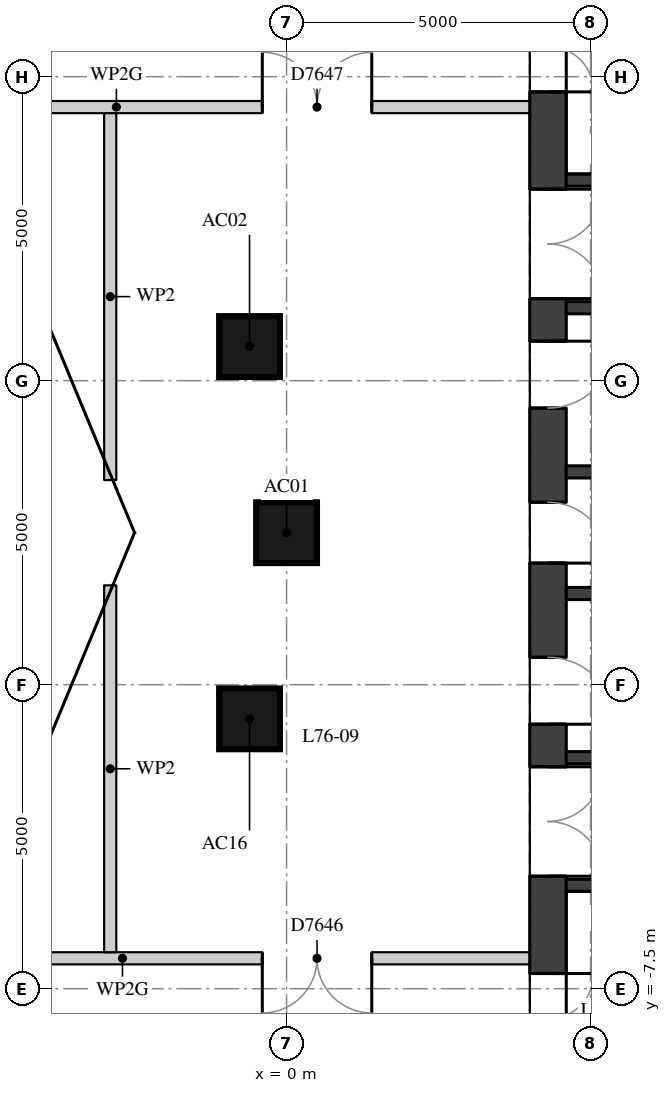
"""IFC4 building model, lengths in metres.
Left out: names, types, materials, properties, quantities, classifications, styles, units other than length and angle.
Written with IfcOpenShell. Run it as: python <this file> out.ifc"""

import sys

from ifc_helpers import new_model, si_unit, direction, frame, frame_2d, origin, origin_2d, place, context, subcontext, project, spatial, rectangle, extrude, element, fill, save


model = new_model("IFC4")
c1 = context("Model", 3, precision=1e-05, world=origin(), true_north=direction((0.0, 1.0)))
c2 = subcontext(c1, "Body", "Model", "MODEL_VIEW")
j1 = project(units=[si_unit("LENGTHUNIT", "METRE"), si_unit("PLANEANGLEUNIT", "RADIAN")], contexts=[c1])
p1 = place(None, origin())
s1 = spatial("IfcSite", under=j1, at=p1, CompositionType="ELEMENT")
p2 = place(p1, origin())
s2 = spatial("IfcBuilding", under=s1, at=p2, CompositionType="ELEMENT")
p3 = place(p2, frame((0.0, 0.0, 269.2)))
s3 = spatial("IfcBuildingStorey", under=s2, at=p3, CompositionType="ELEMENT", Elevation=269.2)
for number, where, z_axis, x_axis in (
    (1, (0.0, 0.0, 0.0), (0.0, 0.0, 1.0), (1.0, 0.0, 0.0)),
    (2, (-0.609, 3.062, 0.0), (0.0, 0.0, 1.0), (1.0, 0.0, 0.0)),
    (3, (-0.609, -3.062, 0.0), (0.0, 0.0, 1.0), (1.0, 0.0, 0.0)),
):
    element("IfcColumn", number, at=place(p3, frame(where, z_axis=z_axis, x_axis=x_axis)), inside=s3, PredefinedType="COLUMN", context=c2, shape_type="SweptSolid", body=[
        extrude(rectangle(XDim=1.0, YDim=1.0, at=origin_2d()), origin(), (0.0, 0.0, 1.0), 6.0),
    ])
p4 = place(p3, frame((4.3, -9.4, 0.0), z_axis=(0.0, 0.0, 1.0), x_axis=(0.0, 1.0, 0.0)))
e4 = element("IfcWall", 4, at=p4, inside=s3, PredefinedType="SHEAR", context=c2, shape_type="SweptSolid", body=[
    extrude(rectangle(XDim=18.8, YDim=0.6, at=frame_2d((9.4, 0.0))), origin(), (0.0, 0.0, 1.0), 5.7),
])
p5 = place(p4, frame((0.65, 0.0, 0.0)))
e5 = element("IfcOpeningElement", 5, at=p5, cuts=e4, PredefinedType="OPENING", context=c2, shape_type="SweptSolid", body=[
    extrude(rectangle(XDim=1.5, YDim=2.1, at=frame_2d((0.75, 1.05))), frame((0.0, 0.31, 0.0), z_axis=(0.0, -1.0, 0.0), x_axis=(1.0, 0.0, 0.0)), (0.0, 0.0, 1.0), 0.62),
])
p6 = place(p4, frame((3.75, 0.0, 0.0)))
e6 = element("IfcOpeningElement", 6, at=p6, cuts=e4, PredefinedType="OPENING", context=c2, shape_type="SweptSolid", body=[
    extrude(rectangle(XDim=1.8, YDim=2.1, at=frame_2d((0.9, 1.05))), frame((0.0, 0.31, 0.0), z_axis=(0.0, -1.0, 0.0), x_axis=(1.0, 0.0, 0.0)), (0.0, 0.0, 1.0), 0.62),
])
p7 = place(p4, frame((6.25, 0.0, 0.0)))
e7 = element("IfcOpeningElement", 7, at=p7, cuts=e4, PredefinedType="OPENING", context=c2, shape_type="SweptSolid", body=[
    extrude(rectangle(XDim=1.1, YDim=2.1, at=frame_2d((0.55, 1.05))), frame((0.0, 0.31, 0.0), z_axis=(0.0, -1.0, 0.0), x_axis=(1.0, 0.0, 0.0)), (0.0, 0.0, 1.0), 0.62),
])
p8 = place(p4, frame((8.9, 0.0, 0.0)))
e8 = element("IfcOpeningElement", 8, at=p8, cuts=e4, PredefinedType="OPENING", context=c2, shape_type="SweptSolid", body=[
    extrude(rectangle(XDim=1.0, YDim=2.1, at=frame_2d((0.5, 1.05))), frame((0.0, 0.31, 0.0), z_axis=(0.0, -1.0, 0.0), x_axis=(1.0, 0.0, 0.0)), (0.0, 0.0, 1.0), 0.62),
])
p9 = place(p4, frame((11.45, 0.0, 0.0)))
e9 = element("IfcOpeningElement", 9, at=p9, cuts=e4, PredefinedType="OPENING", context=c2, shape_type="SweptSolid", body=[
    extrude(rectangle(XDim=1.1, YDim=2.1, at=frame_2d((0.55, 1.05))), frame((0.0, 0.31, 0.0), z_axis=(0.0, -1.0, 0.0), x_axis=(1.0, 0.0, 0.0)), (0.0, 0.0, 1.0), 0.62),
])
p10 = place(p4, frame((13.25, 0.0, 0.0)))
e10 = element("IfcOpeningElement", 10, at=p10, cuts=e4, PredefinedType="OPENING", context=c2, shape_type="SweptSolid", body=[
    extrude(rectangle(XDim=1.8, YDim=2.1, at=frame_2d((0.9, 1.05))), frame((0.0, 0.31, 0.0), z_axis=(0.0, -1.0, 0.0), x_axis=(1.0, 0.0, 0.0)), (0.0, 0.0, 1.0), 0.62),
])
p11 = place(p4, frame((16.65, 0.0, 0.0)))
e11 = element("IfcOpeningElement", 11, at=p11, cuts=e4, PredefinedType="OPENING", context=c2, shape_type="SweptSolid", body=[
    extrude(rectangle(XDim=1.5, YDim=2.1, at=frame_2d((0.75, 1.05))), frame((0.0, 0.31, 0.0), z_axis=(0.0, -1.0, 0.0), x_axis=(1.0, 0.0, 0.0)), (0.0, 0.0, 1.0), 0.62),
])
p12 = place(p3, frame((4.6, 5.8, 0.0), z_axis=(0.0, 0.0, 1.0), x_axis=(1.0, 0.0, 0.0)))
e12 = element("IfcWall", 12, at=p12, inside=s3, PredefinedType="SHEAR", context=c2, shape_type="SweptSolid", body=[
    extrude(rectangle(XDim=10.8, YDim=0.2, at=frame_2d((5.4, 0.0))), origin(), (0.0, 0.0, 1.0), 5.7),
])
p13 = place(p12, frame((8.15, 0.0, 0.0)))
e13 = element("IfcOpeningElement", 13, at=p13, cuts=e12, PredefinedType="OPENING", context=c2, shape_type="SweptSolid", body=[
    extrude(rectangle(XDim=0.9, YDim=2.1, at=frame_2d((0.45, 1.05))), frame((0.0, 0.11, 0.0), z_axis=(0.0, -1.0, 0.0), x_axis=(1.0, 0.0, 0.0)), (0.0, 0.0, 1.0), 0.22),
])
p14 = place(p3, frame((4.6, 3.7, 0.0), z_axis=(0.0, 0.0, 1.0), x_axis=(1.0, 0.0, 0.0)))
e14 = element("IfcWall", 14, at=p14, inside=s3, PredefinedType="SHEAR", context=c2, shape_type="SweptSolid", body=[
    extrude(rectangle(XDim=10.8, YDim=0.2, at=frame_2d((5.4, 0.0))), origin(), (0.0, 0.0, 1.0), 5.7),
])
p15 = place(p14, frame((7.85, 0.0, 0.0)))
e15 = element("IfcOpeningElement", 15, at=p15, cuts=e14, PredefinedType="OPENING", context=c2, shape_type="SweptSolid", body=[
    extrude(rectangle(XDim=0.9, YDim=2.1, at=frame_2d((0.45, 1.05))), frame((0.0, 0.11, 0.0), z_axis=(0.0, -1.0, 0.0), x_axis=(1.0, 0.0, 0.0)), (0.0, 0.0, 1.0), 0.22),
])
for number, where, z_axis, x_axis in (
    (16, (4.6, 1.0, 0.0), (0.0, 0.0, 1.0), (1.0, 0.0, 0.0)),
    (17, (4.6, -1.0, 0.0), (0.0, 0.0, 1.0), (1.0, 0.0, 0.0)),
):
    element("IfcWall", number, at=place(p3, frame(where, z_axis=z_axis, x_axis=x_axis)), inside=s3, PredefinedType="SHEAR", context=c2, shape_type="SweptSolid", body=[
        extrude(rectangle(XDim=10.8, YDim=0.2, at=frame_2d((5.4, 0.0))), origin(), (0.0, 0.0, 1.0), 5.7),
    ])
p16 = place(p3, frame((4.6, -3.7, 0.0), z_axis=(0.0, 0.0, 1.0), x_axis=(1.0, 0.0, 0.0)))
e18 = element("IfcWall", 18, at=p16, inside=s3, PredefinedType="SHEAR", context=c2, shape_type="SweptSolid", body=[
    extrude(rectangle(XDim=10.8, YDim=0.2, at=frame_2d((5.4, 0.0))), origin(), (0.0, 0.0, 1.0), 5.7),
])
p17 = place(p16, frame((7.85, 0.0, 0.0)))
e19 = element("IfcOpeningElement", 19, at=p17, cuts=e18, PredefinedType="OPENING", context=c2, shape_type="SweptSolid", body=[
    extrude(rectangle(XDim=0.9, YDim=2.1, at=frame_2d((0.45, 1.05))), frame((0.0, 0.11, 0.0), z_axis=(0.0, -1.0, 0.0), x_axis=(1.0, 0.0, 0.0)), (0.0, 0.0, 1.0), 0.22),
])
p18 = place(p3, frame((4.6, -5.8, 0.0), z_axis=(0.0, 0.0, 1.0), x_axis=(1.0, 0.0, 0.0)))
e20 = element("IfcWall", 20, at=p18, inside=s3, PredefinedType="SHEAR", context=c2, shape_type="SweptSolid", body=[
    extrude(rectangle(XDim=10.8, YDim=0.2, at=frame_2d((5.4, 0.0))), origin(), (0.0, 0.0, 1.0), 5.7),
])
p19 = place(p18, frame((7.0, 0.0, 0.0)))
e21 = element("IfcOpeningElement", 21, at=p19, cuts=e20, PredefinedType="OPENING", context=c2, shape_type="SweptSolid", body=[
    extrude(rectangle(XDim=1.2, YDim=2.1, at=frame_2d((0.6, 1.05))), frame((0.0, 0.11, 0.0), z_axis=(0.0, -1.0, 0.0), x_axis=(1.0, 0.0, 0.0)), (0.0, 0.0, 1.0), 0.22),
])
p20 = place(p18, frame((9.0, 0.0, 0.0)))
e22 = element("IfcOpeningElement", 22, at=p20, cuts=e20, PredefinedType="OPENING", context=c2, shape_type="SweptSolid", body=[
    extrude(rectangle(XDim=1.2, YDim=2.1, at=frame_2d((0.6, 1.05))), frame((0.0, 0.11, 0.0), z_axis=(0.0, -1.0, 0.0), x_axis=(1.0, 0.0, 0.0)), (0.0, 0.0, 1.0), 0.22),
])
p21 = place(p3, frame((-9.4, -7.0, 0.0), z_axis=(0.0, 0.0, 1.0), x_axis=(1.0, 0.0, 0.0)))
e23 = element("IfcWall", 23, at=p21, inside=s3, PredefinedType="PARTITIONING", context=c2, shape_type="SweptSolid", body=[
    extrude(rectangle(XDim=13.402, YDim=0.2, at=frame_2d((6.701, 0.0))), origin(), (0.0, 0.0, 1.0), 5.15),
])
p22 = place(p21, frame((9.001, 0.0, 0.0)))
e24 = element("IfcOpeningElement", 24, at=p22, cuts=e23, PredefinedType="OPENING", context=c2, shape_type="SweptSolid", body=[
    extrude(rectangle(XDim=1.8, YDim=2.1, at=frame_2d((0.9, 1.05))), frame((0.0, 0.11, 0.0), z_axis=(0.0, -1.0, 0.0), x_axis=(1.0, 0.0, 0.0)), (0.0, 0.0, 1.0), 0.22),
])
p23 = place(p3, frame((-9.6, 7.0, 0.0), z_axis=(0.0, 0.0, 1.0), x_axis=(1.0, 0.0, 0.0)))
e25 = element("IfcWall", 25, at=p23, inside=s3, PredefinedType="PARTITIONING", context=c2, shape_type="SweptSolid", body=[
    extrude(rectangle(XDim=13.602, YDim=0.2, at=frame_2d((6.801, 0.0))), origin(), (0.0, 0.0, 1.0), 5.15),
])
p24 = place(p23, frame((9.201, 0.0, 0.0)))
e26 = element("IfcOpeningElement", 26, at=p24, cuts=e25, PredefinedType="OPENING", context=c2, shape_type="SweptSolid", body=[
    extrude(rectangle(XDim=1.8, YDim=2.1, at=frame_2d((0.9, 1.05))), frame((0.0, 0.11, 0.0), z_axis=(0.0, -1.0, 0.0), x_axis=(1.0, 0.0, 0.0)), (0.0, 0.0, 1.0), 0.22),
])
for number, where, z_axis, x_axis in (
    (27, (-2.9, -6.9, 0.0), (0.0, 0.0, 1.0), (0.0, 1.0, 0.0)),
    (28, (-2.9, 0.866, 0.0), (0.0, 0.0, 1.0), (0.0, 1.0, 0.0)),
):
    element("IfcWall", number, at=place(p3, frame(where, z_axis=z_axis, x_axis=x_axis)), inside=s3, PredefinedType="PARTITIONING", context=c2, shape_type="SweptSolid", body=[
        extrude(rectangle(XDim=6.034, YDim=0.2, at=frame_2d((3.017, 0.0))), origin(), (0.0, 0.0, 1.0), 5.7),
    ])
p25 = place(p5, origin())
e29 = element("IfcDoor", 29, at=p25, inside=s3, OperationType="DOUBLE_DOOR_SINGLE_SWING", PredefinedType="DOOR", context=c2, shape_type="SweptSolid", body=[
    extrude(rectangle(XDim=1.5, YDim=2.1, at=frame_2d((0.75, 1.05))), frame((0.0, 0.025, 0.0), z_axis=(0.0, -1.0, 0.0), x_axis=(1.0, 0.0, 0.0)), (0.0, 0.0, 1.0), 0.05),
])
fill(e5, e29)
p26 = place(p6, origin())
e30 = element("IfcDoor", 30, at=p26, inside=s3, OperationType="DOUBLE_DOOR_SINGLE_SWING", PredefinedType="DOOR", context=c2, shape_type="SweptSolid", body=[
    extrude(rectangle(XDim=1.8, YDim=2.1, at=frame_2d((0.9, 1.05))), frame((0.0, 0.025, 0.0), z_axis=(0.0, -1.0, 0.0), x_axis=(1.0, 0.0, 0.0)), (0.0, 0.0, 1.0), 0.05),
])
fill(e6, e30)
p27 = place(p7, origin())
e31 = element("IfcDoor", 31, at=p27, inside=s3, OperationType="SINGLE_SWING_RIGHT", PredefinedType="DOOR", context=c2, shape_type="SweptSolid", body=[
    extrude(rectangle(XDim=1.1, YDim=2.1, at=frame_2d((0.55, 1.05))), frame((0.0, 0.025, 0.0), z_axis=(0.0, -1.0, 0.0), x_axis=(1.0, 0.0, 0.0)), (0.0, 0.0, 1.0), 0.05),
])
fill(e7, e31)
p28 = place(p8, origin())
e32 = element("IfcDoor", 32, at=p28, inside=s3, OperationType="SINGLE_SWING_RIGHT", PredefinedType="DOOR", context=c2, shape_type="SweptSolid", body=[
    extrude(rectangle(XDim=1.0, YDim=2.1, at=frame_2d((0.5, 1.05))), frame((0.0, 0.025, 0.0), z_axis=(0.0, -1.0, 0.0), x_axis=(1.0, 0.0, 0.0)), (0.0, 0.0, 1.0), 0.05),
])
fill(e8, e32)
p29 = place(p9, origin())
e33 = element("IfcDoor", 33, at=p29, inside=s3, OperationType="SINGLE_SWING_LEFT", PredefinedType="DOOR", context=c2, shape_type="SweptSolid", body=[
    extrude(rectangle(XDim=1.1, YDim=2.1, at=frame_2d((0.55, 1.05))), frame((0.0, 0.025, 0.0), z_axis=(0.0, -1.0, 0.0), x_axis=(1.0, 0.0, 0.0)), (0.0, 0.0, 1.0), 0.05),
])
fill(e9, e33)
p30 = place(p10, origin())
e34 = element("IfcDoor", 34, at=p30, inside=s3, OperationType="DOUBLE_DOOR_SINGLE_SWING", PredefinedType="DOOR", context=c2, shape_type="SweptSolid", body=[
    extrude(rectangle(XDim=1.8, YDim=2.1, at=frame_2d((0.9, 1.05))), frame((0.0, 0.025, 0.0), z_axis=(0.0, -1.0, 0.0), x_axis=(1.0, 0.0, 0.0)), (0.0, 0.0, 1.0), 0.05),
])
fill(e10, e34)
p31 = place(p11, origin())
e35 = element("IfcDoor", 35, at=p31, inside=s3, OperationType="DOUBLE_DOOR_SINGLE_SWING", PredefinedType="DOOR", context=c2, shape_type="SweptSolid", body=[
    extrude(rectangle(XDim=1.5, YDim=2.1, at=frame_2d((0.75, 1.05))), frame((0.0, 0.025, 0.0), z_axis=(0.0, -1.0, 0.0), x_axis=(1.0, 0.0, 0.0)), (0.0, 0.0, 1.0), 0.05),
])
fill(e11, e35)
p32 = place(p24, origin())
e36 = element("IfcDoor", 36, at=p32, inside=s3, OperationType="DOUBLE_DOOR_SINGLE_SWING", PredefinedType="DOOR", context=c2, shape_type="SweptSolid", body=[
    extrude(rectangle(XDim=1.8, YDim=2.1, at=frame_2d((0.9, 1.05))), frame((0.0, 0.025, 0.0), z_axis=(0.0, -1.0, 0.0), x_axis=(1.0, 0.0, 0.0)), (0.0, 0.0, 1.0), 0.05),
])
fill(e26, e36)
p33 = place(p22, origin())
e37 = element("IfcDoor", 37, at=p33, inside=s3, OperationType="DOUBLE_DOOR_SINGLE_SWING", PredefinedType="DOOR", context=c2, shape_type="SweptSolid", body=[
    extrude(rectangle(XDim=1.8, YDim=2.1, at=frame_2d((0.9, 1.05))), frame((0.0, 0.025, 0.0), z_axis=(0.0, -1.0, 0.0), x_axis=(1.0, 0.0, 0.0)), (0.0, 0.0, 1.0), 0.05),
])
fill(e24, e37)
save(model, sys.argv[1])
